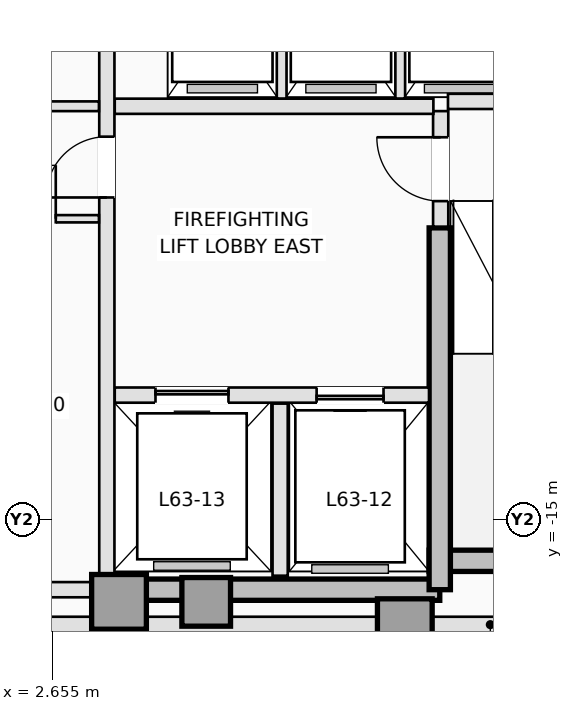
"""IFC4 building model, lengths in metres.
Left out: names, types, materials, properties, quantities, classifications, styles, units other than length and angle.
Written with IfcOpenShell. Run it as: python <this file> out.ifc"""

import sys

from ifc_helpers import new_model, si_unit, direction, frame, frame_2d, origin, origin_2d, place, context, subcontext, project, spatial, rectangle, extrude, element, fill, save


model = new_model("IFC4")
c1 = context("Model", 3, precision=1e-05, world=origin(), true_north=direction((0.0, 1.0)))
c2 = subcontext(c1, "Body", "Model", "MODEL_VIEW")
j1 = project(units=[si_unit("LENGTHUNIT", "METRE"), si_unit("PLANEANGLEUNIT", "RADIAN")], contexts=[c1])
p1 = place(None, origin())
s1 = spatial("IfcSite", under=j1, at=p1, CompositionType="ELEMENT")
p2 = place(p1, origin())
s2 = spatial("IfcBuilding", under=s1, at=p2, CompositionType="ELEMENT")
p3 = place(p2, frame((0.0, 0.0, 228.9)))
s3 = spatial("IfcBuildingStorey", under=s2, at=p3, CompositionType="ELEMENT", Elevation=228.9)
p4 = place(p3, frame((3.75, -16.15, 0.0), z_axis=(0.0, 0.0, 1.0), x_axis=(1.0, 0.0, 0.0)))
e1 = element("IfcWall", 1, at=p4, inside=s3, PredefinedType="SHEAR", context=c2, shape_type="SweptSolid", body=[
    extrude(rectangle(XDim=5.275, YDim=0.35, at=frame_2d((2.637, 0.0))), origin(), (0.0, 0.0, 1.0), 3.5),
])
p5 = place(p3, frame((8.85, -15.675, 0.0), z_axis=(0.0, 0.0, 1.0), x_axis=(1.0, 0.0, 0.0)))
e2 = element("IfcWall", 2, at=p5, inside=s3, PredefinedType="SHEAR", context=c2, shape_type="SweptSolid", body=[
    extrude(rectangle(XDim=3.7, YDim=0.35, at=frame_2d((1.85, 0.0))), origin(), (0.0, 0.0, 1.0), 3.5),
])
p6 = place(p3, frame((9.025, -16.15, 0.0), z_axis=(0.0, 0.0, 1.0), x_axis=(0.0, 1.0, 0.0)))
e3 = element("IfcWall", 3, at=p6, inside=s3, PredefinedType="SHEAR", context=c2, shape_type="SweptSolid", body=[
    extrude(rectangle(XDim=5.95, YDim=0.35, at=frame_2d((2.975, 0.0))), origin(), (0.0, 0.0, 1.0), 3.5),
])
for number, where, z_axis, x_axis in (
    (4, (3.75, -16.35, 0.0), (0.0, 0.0, 1.0), (1.0, 0.0, 0.0)),
    (5, (8.45, -16.75, 0.0), (0.0, 0.0, 1.0), (1.0, 0.0, 0.0)),
):
    element("IfcColumn", number, at=place(p3, frame(where, z_axis=z_axis, x_axis=x_axis)), inside=s3, PredefinedType="COLUMN", context=c2, shape_type="SweptSolid", body=[
        extrude(rectangle(XDim=0.9, YDim=0.9, at=origin_2d()), origin(), (0.0, 0.0, 1.0), 3.5),
    ])
p7 = place(p3, frame((5.184, -16.35, 0.0), z_axis=(0.0, 0.0, 1.0), x_axis=(0.0, 1.0, 0.0)))
e6 = element("IfcColumn", 6, at=p7, inside=s3, PredefinedType="COLUMN", context=c2, shape_type="SweptSolid", body=[
    extrude(rectangle(XDim=0.8, YDim=0.8, at=origin_2d()), origin(), (0.0, 0.0, 1.0), 3.5),
])
p8 = place(p3, frame((15.493, -16.725, 0.0), z_axis=(0.0, 0.0, 1.0), x_axis=(-1.0, 0.0, 0.0)))
e7 = element("IfcWall", 7, at=p8, inside=s3, PredefinedType="STANDARD", context=c2, shape_type="SweptSolid", body=[
    extrude(rectangle(XDim=11.273, YDim=0.26, at=frame_2d((5.636, 0.0))), origin(), (0.0, 0.0, 1.0), 2.79),
])
p9 = place(p3, frame((3.28, -16.725, 0.0), z_axis=(0.0, 0.0, 1.0), x_axis=(-1.0, 0.0, 0.0)))
e8 = element("IfcWall", 8, at=p9, inside=s3, PredefinedType="STANDARD", context=c2, shape_type="SweptSolid", body=[
    extrude(rectangle(XDim=2.674, YDim=0.26, at=frame_2d((1.337, 0.0))), origin(), (0.0, 0.0, 1.0), 3.25),
])
p10 = place(p3, frame((9.04, -10.18, 0.0), z_axis=(0.0, 0.0, 1.0), x_axis=(0.0, 1.0, 0.0)))
e9 = element("IfcWall", 9, at=p10, inside=s3, PredefinedType="PARTITIONING", context=c2, shape_type="SweptSolid", body=[
    extrude(rectangle(XDim=1.9, YDim=0.25, at=frame_2d((0.95, 0.0))), origin(), (0.0, 0.0, 1.0), 3.25),
])
p11 = place(p10, frame((0.42, 0.0, 0.0)))
e10 = element("IfcOpeningElement", 10, at=p11, cuts=e9, PredefinedType="OPENING", context=c2, shape_type="SweptSolid", body=[
    extrude(rectangle(XDim=1.05, YDim=2.15, at=frame_2d((0.525, 1.075))), frame((0.0, 0.135, 0.0), z_axis=(0.0, -1.0, 0.0), x_axis=(1.0, 0.0, 0.0)), (0.0, 0.0, 1.0), 0.27),
])
p12 = place(p3, frame((9.16, -8.12, 0.0), z_axis=(0.0, 0.0, 1.0), x_axis=(1.0, 0.0, 0.0)))
e11 = element("IfcWall", 11, at=p12, inside=s3, PredefinedType="PARTITIONING", context=c2, shape_type="SweptSolid", body=[
    extrude(rectangle(XDim=3.22, YDim=0.25, at=frame_2d((1.61, 0.0))), origin(), (0.0, 0.0, 1.0), 3.25),
])
p13 = place(p3, frame((3.68, -12.95, 0.0), z_axis=(0.0, 0.0, 1.0), x_axis=(1.0, 0.0, 0.0)))
e12 = element("IfcWall", 12, at=p13, inside=s3, PredefinedType="PARTITIONING", context=c2, shape_type="SweptSolid", body=[
    extrude(rectangle(XDim=5.168, YDim=0.25, at=frame_2d((2.584, 0.0))), origin(), (0.0, 0.0, 1.0), 3.25),
])
p14 = place(p13, frame((3.32, 0.0, 0.0)))
e13 = element("IfcOpeningElement", 13, at=p14, cuts=e12, PredefinedType="OPENING", context=c2, shape_type="SweptSolid", body=[
    extrude(rectangle(XDim=1.1, YDim=2.15, at=frame_2d((0.55, 1.075))), frame((0.0, 0.135, 0.0), z_axis=(0.0, -1.0, 0.0), x_axis=(1.0, 0.0, 0.0)), (0.0, 0.0, 1.0), 0.27),
])
p15 = place(p13, frame((0.67, 0.0, 0.0)))
e14 = element("IfcOpeningElement", 14, at=p15, cuts=e12, PredefinedType="OPENING", context=c2, shape_type="SweptSolid", body=[
    extrude(rectangle(XDim=1.2, YDim=2.15, at=frame_2d((0.6, 1.075))), frame((0.0, 0.135, 0.0), z_axis=(0.0, -1.0, 0.0), x_axis=(1.0, 0.0, 0.0)), (0.0, 0.0, 1.0), 0.27),
])
p16 = place(p3, frame((6.4, -15.92, 0.0), z_axis=(0.0, 0.0, 1.0), x_axis=(0.0, 1.0, 0.0)))
e15 = element("IfcWall", 15, at=p16, inside=s3, PredefinedType="PARTITIONING", context=c2, shape_type="SweptSolid", body=[
    extrude(rectangle(XDim=2.83, YDim=0.25, at=frame_2d((1.415, 0.0))), origin(), (0.0, 0.0, 1.0), 3.25),
])
p17 = place(p3, frame((3.68, -8.2, 0.0), z_axis=(0.0, 0.0, 1.0), x_axis=(1.0, 0.0, 0.0)))
e16 = element("IfcWall", 16, at=p17, inside=s3, PredefinedType="PARTITIONING", context=c2, shape_type="SweptSolid", body=[
    extrude(rectangle(XDim=5.24, YDim=0.25, at=frame_2d((2.62, 0.0))), origin(), (0.0, 0.0, 1.0), 3.25),
])
p18 = place(p3, frame((3.55, -15.898, 0.0), z_axis=(0.0, 0.0, 1.0), x_axis=(0.0, 1.0, 0.0)))
e17 = element("IfcWall", 17, at=p18, inside=s3, PredefinedType="PARTITIONING", context=c2, shape_type="SweptSolid", body=[
    extrude(rectangle(XDim=10.558, YDim=0.25, at=frame_2d((5.279, 0.0))), origin(), (0.0, 0.0, 1.0), 3.25),
])
p19 = place(p18, frame((6.198, 0.0, 0.0)))
e18 = element("IfcOpeningElement", 18, at=p19, cuts=e17, PredefinedType="OPENING", context=c2, shape_type="SweptSolid", body=[
    extrude(rectangle(XDim=1.0, YDim=2.15, at=frame_2d((0.5, 1.075))), frame((0.0, 0.135, 0.0), z_axis=(0.0, -1.0, 0.0), x_axis=(1.0, 0.0, 0.0)), (0.0, 0.0, 1.0), 0.27),
])
for number, where, z_axis, x_axis in (
    (19, (6.425, -8.073, 0.0), (0.0, 0.0, 1.0), (0.0, 1.0, 0.0)),
    (20, (8.375, -8.073, 0.0), (0.0, 0.0, 1.0), (0.0, 1.0, 0.0)),
):
    element("IfcWall", number, at=place(p3, frame(where, z_axis=z_axis, x_axis=x_axis)), inside=s3, PredefinedType="PARTITIONING", context=c2, shape_type="SweptSolid", body=[
        extrude(rectangle(XDim=2.733, YDim=0.16, at=frame_2d((1.366, 0.0))), origin(), (0.0, 0.0, 1.0), 3.25),
    ])
p20 = place(p3, frame((-3.298, -16.15, 0.0), z_axis=(0.0, 0.0, 1.0), x_axis=(1.0, 0.0, 0.0)))
e21 = element("IfcWall", 21, at=p20, inside=s3, PredefinedType="PARTITIONING", context=c2, shape_type="SweptSolid", body=[
    extrude(rectangle(XDim=6.596, YDim=0.25, at=frame_2d((3.298, 0.0))), origin(), (0.0, 0.0, 1.0), 2.844),
])
p21 = place(p3, frame((-3.42, -8.2, 0.0), z_axis=(0.0, 0.0, 1.0), x_axis=(1.0, 0.0, 0.0)))
e22 = element("IfcWall", 22, at=p21, inside=s3, PredefinedType="PARTITIONING", context=c2, shape_type="SweptSolid", body=[
    extrude(rectangle(XDim=6.84, YDim=0.16, at=frame_2d((3.42, 0.0))), origin(), (0.0, 0.0, 1.0), 3.25),
])
p22 = place(p21, frame((2.92, 0.0, 0.0)))
e23 = element("IfcOpeningElement", 23, at=p22, cuts=e22, PredefinedType="OPENING", context=c2, shape_type="SweptSolid", body=[
    extrude(rectangle(XDim=1.0, YDim=2.15, at=frame_2d((0.5, 1.075))), frame((0.0, 0.09, 0.0), z_axis=(0.0, -1.0, 0.0), x_axis=(1.0, 0.0, 0.0)), (0.0, 0.0, 1.0), 0.18),
])
p23 = place(p3, frame((-3.42, -10.05, 0.0), z_axis=(0.0, 0.0, 1.0), x_axis=(1.0, 0.0, 0.0)))
e24 = element("IfcWall", 24, at=p23, inside=s3, PredefinedType="PARTITIONING", context=c2, shape_type="SweptSolid", body=[
    extrude(rectangle(XDim=6.84, YDim=0.12, at=frame_2d((3.42, 0.0))), origin(), (0.0, 0.0, 1.0), 3.25),
])
p24 = place(p23, frame((0.65, 0.0, 0.0)))
e25 = element("IfcOpeningElement", 25, at=p24, cuts=e24, PredefinedType="OPENING", context=c2, shape_type="SweptSolid", body=[
    extrude(rectangle(XDim=0.88, YDim=2.12, at=frame_2d((0.44, 1.06))), frame((0.0, 0.07, 0.0), z_axis=(0.0, -1.0, 0.0), x_axis=(1.0, 0.0, 0.0)), (0.0, 0.0, 1.0), 0.14),
])
p25 = place(p23, frame((2.98, 0.0, 0.0)))
e26 = element("IfcOpeningElement", 26, at=p25, cuts=e24, PredefinedType="OPENING", context=c2, shape_type="SweptSolid", body=[
    extrude(rectangle(XDim=0.88, YDim=2.12, at=frame_2d((0.44, 1.06))), frame((0.0, 0.07, 0.0), z_axis=(0.0, -1.0, 0.0), x_axis=(1.0, 0.0, 0.0)), (0.0, 0.0, 1.0), 0.14),
])
p26 = place(p23, frame((5.25, 0.0, 0.0)))
e27 = element("IfcOpeningElement", 27, at=p26, cuts=e24, PredefinedType="OPENING", context=c2, shape_type="SweptSolid", body=[
    extrude(rectangle(XDim=0.88, YDim=2.12, at=frame_2d((0.44, 1.06))), frame((0.0, 0.07, 0.0), z_axis=(0.0, -1.0, 0.0), x_axis=(1.0, 0.0, 0.0)), (0.0, 0.0, 1.0), 0.14),
])
p27 = place(p14, origin())
e28 = element("IfcDoor", 28, at=p27, inside=s3, OperationType="SLIDING_TO_RIGHT", PredefinedType="DOOR", context=c2, shape_type="SweptSolid", body=[
    extrude(rectangle(XDim=1.1, YDim=2.15, at=frame_2d((0.55, 1.075))), frame((0.0, 0.025, 0.0), z_axis=(0.0, -1.0, 0.0), x_axis=(1.0, 0.0, 0.0)), (0.0, 0.0, 1.0), 0.05),
])
fill(e13, e28)
p28 = place(p15, origin())
e29 = element("IfcDoor", 29, at=p28, inside=s3, OperationType="SLIDING_TO_LEFT", PredefinedType="DOOR", context=c2, shape_type="SweptSolid", body=[
    extrude(rectangle(XDim=1.2, YDim=2.15, at=frame_2d((0.6, 1.075))), frame((0.0, 0.025, 0.0), z_axis=(0.0, -1.0, 0.0), x_axis=(1.0, 0.0, 0.0)), (0.0, 0.0, 1.0), 0.05),
])
fill(e14, e29)
p29 = place(p11, origin())
e30 = element("IfcDoor", 30, at=p29, inside=s3, OperationType="SINGLE_SWING_RIGHT", PredefinedType="DOOR", context=c2, shape_type="SweptSolid", body=[
    extrude(rectangle(XDim=1.05, YDim=2.15, at=frame_2d((0.525, 1.075))), frame((0.0, 0.025, 0.0), z_axis=(0.0, -1.0, 0.0), x_axis=(1.0, 0.0, 0.0)), (0.0, 0.0, 1.0), 0.05),
])
fill(e10, e30)
p30 = place(p19, origin())
e31 = element("IfcDoor", 31, at=p30, inside=s3, OperationType="SINGLE_SWING_LEFT", PredefinedType="DOOR", context=c2, shape_type="SweptSolid", body=[
    extrude(rectangle(XDim=1.0, YDim=2.15, at=frame_2d((0.5, 1.075))), frame((0.0, 0.025, 0.0), z_axis=(0.0, -1.0, 0.0), x_axis=(1.0, 0.0, 0.0)), (0.0, 0.0, 1.0), 0.05),
])
fill(e18, e31)
p31 = place(p26, origin())
e32 = element("IfcDoor", 32, at=p31, inside=s3, OperationType="SINGLE_SWING_RIGHT", PredefinedType="DOOR", context=c2, shape_type="SweptSolid", body=[
    extrude(rectangle(XDim=0.88, YDim=2.12, at=frame_2d((0.44, 1.06))), frame((0.0, 0.025, 0.0), z_axis=(0.0, -1.0, 0.0), x_axis=(1.0, 0.0, 0.0)), (0.0, 0.0, 1.0), 0.05),
])
fill(e27, e32)
save(model, sys.argv[1])
